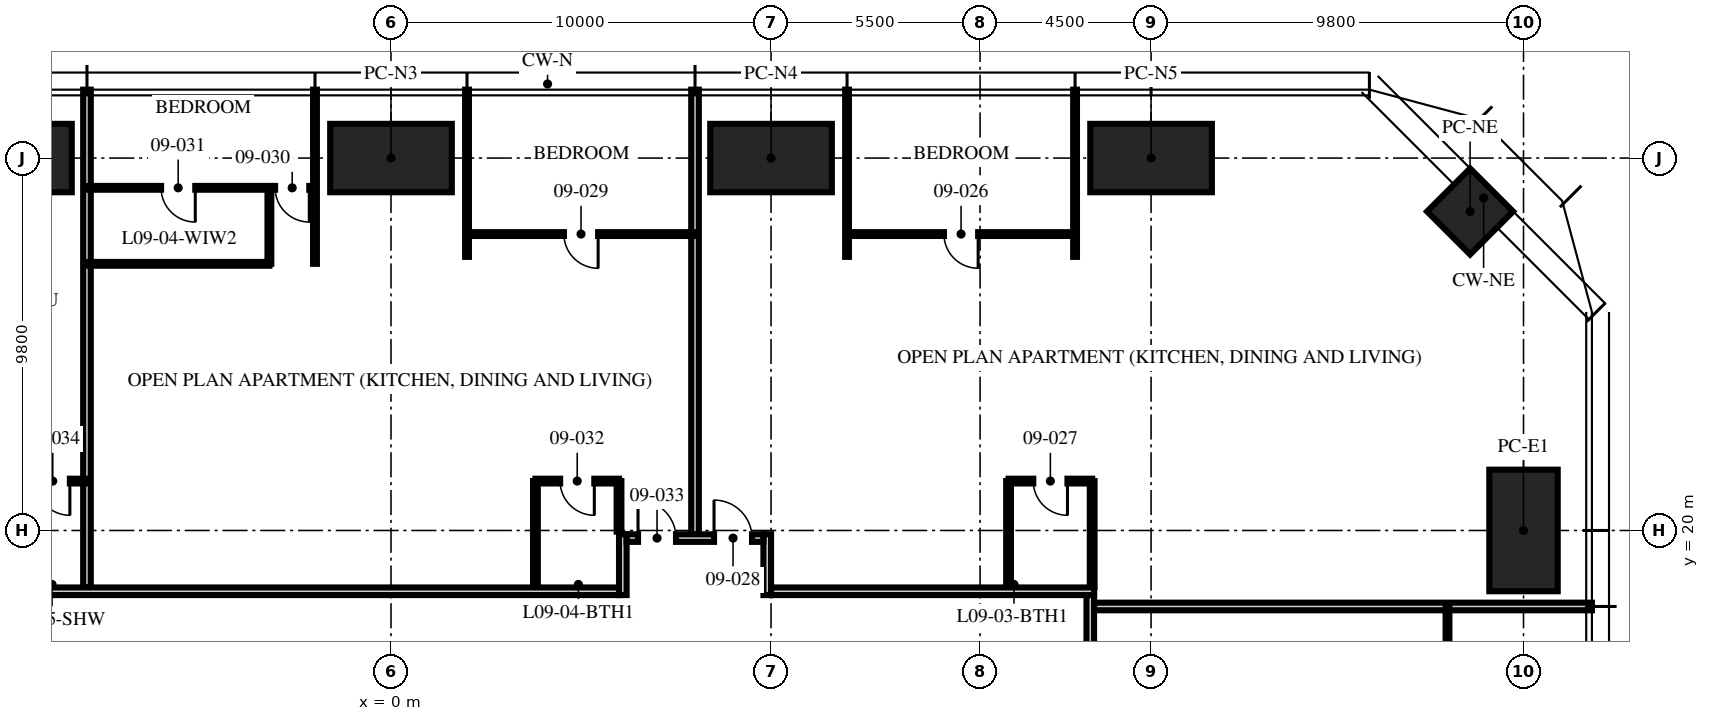
"""IFC4 building model, lengths in metres.
Left out: names, types, materials, properties, quantities, classifications, styles, units other than length and angle.
Written with IfcOpenShell. Run it as: python <this file> out.ifc"""

import sys

from ifc_helpers import new_model, si_unit, direction, frame, frame_2d, origin, origin_2d, place, context, subcontext, project, spatial, rectangle, hollow_rectangle, extrude, element, fill, save


model = new_model("IFC4")
c1 = context("Model", 3, precision=1e-05, world=origin(), true_north=direction((0.0, 1.0)))
c2 = subcontext(c1, "Body", "Model", "MODEL_VIEW")
j1 = project(units=[si_unit("LENGTHUNIT", "METRE"), si_unit("PLANEANGLEUNIT", "RADIAN")], contexts=[c1])
p1 = place(None, origin())
s1 = spatial("IfcSite", under=j1, at=p1, CompositionType="ELEMENT")
p2 = place(p1, origin())
s2 = spatial("IfcBuilding", under=s1, at=p2, CompositionType="ELEMENT")
p3 = place(p2, frame((0.0, 0.0, 39.75)))
s3 = spatial("IfcBuildingStorey", under=s2, at=p3, CompositionType="ELEMENT", Elevation=39.75)
for number, where, z_axis, x_axis in (
    (1, (-10.0, 29.8, 0.0), (0.0, 0.0, 1.0), (1.0, 0.0, 0.0)),
    (2, (0.0, 29.8, 0.0), (0.0, 0.0, 1.0), (1.0, 0.0, 0.0)),
    (3, (10.0, 29.8, 0.0), (0.0, 0.0, 1.0), (1.0, 0.0, 0.0)),
    (4, (20.0, 29.8, 0.0), (0.0, 0.0, 1.0), (1.0, 0.0, 0.0)),
    (5, (29.8, 20.0, 0.0), (0.0, 0.0, 1.0), (0.0, 1.0, 0.0)),
):
    element("IfcColumn", number, at=place(p3, frame(where, z_axis=z_axis, x_axis=x_axis)), inside=s3, PredefinedType="COLUMN", context=c2, shape_type="SweptSolid", body=[
        extrude(hollow_rectangle(XDim=3.2, YDim=1.8, WallThickness=0.2, at=origin_2d()), origin(), (0.0, 0.0, 1.0), 3.75),
    ])
p4 = place(p3, frame((28.394, 28.394, 0.0), z_axis=(0.0, 0.0, 1.0), x_axis=(0.707106781187, -0.707106781187, 0.0)))
e6 = element("IfcColumn", 6, at=p4, inside=s3, PredefinedType="COLUMN", context=c2, shape_type="SweptSolid", body=[
    extrude(hollow_rectangle(XDim=1.6, YDim=1.6, WallThickness=0.1, at=origin_2d()), origin(), (0.0, 0.0, 1.0), 3.75),
])
p5 = place(p3, frame((18.5, 18.0, 0.0), z_axis=(0.0, 0.0, 1.0), x_axis=(1.0, 0.0, 0.0)))
e7 = element("IfcWall", 7, at=p5, inside=s3, PredefinedType="PARTITIONING", context=c2, shape_type="SweptSolid", body=[
    extrude(rectangle(XDim=13.1, YDim=0.2, at=frame_2d((6.55, 0.0))), origin(), (0.0, 0.0, 1.0), 2.3),
])
for number, where, z_axis, x_axis in (
    (8, (18.0, 27.2, 0.0), (0.0, 0.0, 1.0), (0.0, 1.0, 0.0)),
    (9, (12.0, 27.2, 0.0), (0.0, 0.0, 1.0), (0.0, 1.0, 0.0)),
):
    element("IfcWall", number, at=place(p3, frame(where, z_axis=z_axis, x_axis=x_axis)), inside=s3, PredefinedType="PARTITIONING", context=c2, shape_type="SweptSolid", body=[
        extrude(rectangle(XDim=4.4, YDim=0.1, at=frame_2d((2.2, 0.0))), origin(), (0.0, 0.0, 1.0), 2.71),
    ])
p6 = place(p3, frame((8.0, 19.9, 0.0), z_axis=(0.0, 0.0, 1.0), x_axis=(0.0, 1.0, 0.0)))
e10 = element("IfcWall", 10, at=p6, inside=s3, PredefinedType="PARTITIONING", context=c2, shape_type="SweptSolid", body=[
    extrude(rectangle(XDim=11.7, YDim=0.2, at=frame_2d((5.85, 0.0))), origin(), (0.0, 0.0, 1.0), 2.71),
])
p7 = place(p3, frame((2.0, 27.2, 0.0), z_axis=(0.0, 0.0, 1.0), x_axis=(0.0, 1.0, 0.0)))
e11 = element("IfcWall", 11, at=p7, inside=s3, PredefinedType="PARTITIONING", context=c2, shape_type="SweptSolid", body=[
    extrude(rectangle(XDim=4.4, YDim=0.1, at=frame_2d((2.2, 0.0))), origin(), (0.0, 0.0, 1.0), 2.71),
])
p8 = place(p3, frame((-2.0, 27.017, 0.0), z_axis=(0.0, 0.0, 1.0), x_axis=(0.0, 1.0, 0.0)))
e12 = element("IfcWall", 12, at=p8, inside=s3, PredefinedType="PARTITIONING", context=c2, shape_type="SweptSolid", body=[
    extrude(rectangle(XDim=4.583, YDim=0.1, at=frame_2d((2.292, 0.0))), origin(), (0.0, 0.0, 1.0), 2.71),
])
p9 = place(p3, frame((-8.0, 18.5, 0.0), z_axis=(0.0, 0.0, 1.0), x_axis=(0.0, 1.0, 0.0)))
e13 = element("IfcWall", 13, at=p9, inside=s3, PredefinedType="PARTITIONING", context=c2, shape_type="SweptSolid", body=[
    extrude(rectangle(XDim=13.1, YDim=0.2, at=frame_2d((6.55, 0.0))), origin(), (0.0, 0.0, 1.0), 2.71),
])
p10 = place(p3, frame((27.8, 12.0, 0.0), z_axis=(0.0, 0.0, 1.0), x_axis=(0.0, 1.0, 0.0)))
e14 = element("IfcWall", 14, at=p10, inside=s3, PredefinedType="PARTITIONING", context=c2, shape_type="SweptSolid", body=[
    extrude(rectangle(XDim=6.0, YDim=0.1, at=frame_2d((3.0, 0.0))), origin(), (0.0, 0.0, 1.0), 2.61),
])
p11 = place(p10, frame((2.55, 0.0, 0.0)))
e15 = element("IfcOpeningElement", 15, at=p11, cuts=e14, PredefinedType="OPENING", context=c2, shape_type="SweptSolid", body=[
    extrude(rectangle(XDim=0.9, YDim=2.1, at=frame_2d((0.45, 1.05))), frame((0.0, 0.06, 0.0), z_axis=(0.0, -1.0, 0.0), x_axis=(1.0, 0.0, 0.0)), (0.0, 0.0, 1.0), 0.12),
])
p12 = place(p3, frame((18.0, 27.8, 0.0), z_axis=(0.0, 0.0, 1.0), x_axis=(-1.0, 0.0, 0.0)))
e16 = element("IfcWall", 16, at=p12, inside=s3, PredefinedType="PARTITIONING", context=c2, shape_type="SweptSolid", body=[
    extrude(rectangle(XDim=6.0, YDim=0.1, at=frame_2d((3.0, 0.0))), origin(), (0.0, 0.0, 1.0), 2.61),
])
p13 = place(p12, frame((2.55, 0.0, 0.0)))
e17 = element("IfcOpeningElement", 17, at=p13, cuts=e16, PredefinedType="OPENING", context=c2, shape_type="SweptSolid", body=[
    extrude(rectangle(XDim=0.9, YDim=2.1, at=frame_2d((0.45, 1.05))), frame((0.0, 0.06, 0.0), z_axis=(0.0, -1.0, 0.0), x_axis=(1.0, 0.0, 0.0)), (0.0, 0.0, 1.0), 0.12),
])
p14 = place(p3, frame((18.45, 21.3, 0.0), z_axis=(0.0, 0.0, 1.0), x_axis=(-1.0, 0.0, 0.0)))
e18 = element("IfcWall", 18, at=p14, inside=s3, PredefinedType="PARTITIONING", context=c2, shape_type="SweptSolid", body=[
    extrude(rectangle(XDim=2.2, YDim=0.125, at=frame_2d((1.1, 0.0))), origin(), (0.0, 0.0, 1.0), 3.5),
])
p15 = place(p14, frame((0.65, 0.0, 0.0)))
e19 = element("IfcOpeningElement", 19, at=p15, cuts=e18, PredefinedType="OPENING", context=c2, shape_type="SweptSolid", body=[
    extrude(rectangle(XDim=0.9, YDim=2.1, at=frame_2d((0.45, 1.05))), frame((0.0, 0.073, 0.0), z_axis=(0.0, -1.0, 0.0), x_axis=(1.0, 0.0, 0.0)), (0.0, 0.0, 1.0), 0.145),
])
p16 = place(p3, frame((18.45, 18.5, 0.0), z_axis=(0.0, 0.0, 1.0), x_axis=(0.0, 1.0, 0.0)))
e20 = element("IfcWall", 20, at=p16, inside=s3, PredefinedType="PARTITIONING", context=c2, shape_type="SweptSolid", body=[
    extrude(rectangle(XDim=2.8, YDim=0.125, at=frame_2d((1.4, 0.0))), origin(), (0.0, 0.0, 1.0), 2.3),
])
p17 = place(p3, frame((16.25, 18.5, 0.0), z_axis=(0.0, 0.0, 1.0), x_axis=(0.0, 1.0, 0.0)))
e21 = element("IfcWall", 21, at=p17, inside=s3, PredefinedType="PARTITIONING", context=c2, shape_type="SweptSolid", body=[
    extrude(rectangle(XDim=2.8, YDim=0.125, at=frame_2d((1.4, 0.0))), origin(), (0.0, 0.0, 1.0), 3.5),
])
p18 = place(p3, frame((8.0, 27.8, 0.0), z_axis=(0.0, 0.0, 1.0), x_axis=(-1.0, 0.0, 0.0)))
e22 = element("IfcWall", 22, at=p18, inside=s3, PredefinedType="PARTITIONING", context=c2, shape_type="SweptSolid", body=[
    extrude(rectangle(XDim=6.0, YDim=0.1, at=frame_2d((3.0, 0.0))), origin(), (0.0, 0.0, 1.0), 2.61),
])
p19 = place(p18, frame((2.55, 0.0, 0.0)))
e23 = element("IfcOpeningElement", 23, at=p19, cuts=e22, PredefinedType="OPENING", context=c2, shape_type="SweptSolid", body=[
    extrude(rectangle(XDim=0.9, YDim=2.1, at=frame_2d((0.45, 1.05))), frame((0.0, 0.06, 0.0), z_axis=(0.0, -1.0, 0.0), x_axis=(1.0, 0.0, 0.0)), (0.0, 0.0, 1.0), 0.12),
])
p20 = place(p3, frame((-2.0, 29.017, 0.0), z_axis=(0.0, 0.0, 1.0), x_axis=(-1.0, 0.0, 0.0)))
e24 = element("IfcWall", 24, at=p20, inside=s3, PredefinedType="PARTITIONING", context=c2, shape_type="SweptSolid", body=[
    extrude(rectangle(XDim=6.0, YDim=0.1, at=frame_2d((3.0, 0.0))), origin(), (0.0, 0.0, 1.0), 2.61),
])
p21 = place(p20, frame((0.15, 0.0, 0.0)))
e25 = element("IfcOpeningElement", 25, at=p21, cuts=e24, PredefinedType="OPENING", context=c2, shape_type="SweptSolid", body=[
    extrude(rectangle(XDim=0.9, YDim=2.1, at=frame_2d((0.45, 1.05))), frame((0.0, 0.06, 0.0), z_axis=(0.0, -1.0, 0.0), x_axis=(1.0, 0.0, 0.0)), (0.0, 0.0, 1.0), 0.12),
])
p22 = place(p20, frame((3.15, 0.0, 0.0)))
e26 = element("IfcOpeningElement", 26, at=p22, cuts=e24, PredefinedType="OPENING", context=c2, shape_type="SweptSolid", body=[
    extrude(rectangle(XDim=0.9, YDim=2.1, at=frame_2d((0.45, 1.05))), frame((0.0, 0.06, 0.0), z_axis=(0.0, -1.0, 0.0), x_axis=(1.0, 0.0, 0.0)), (0.0, 0.0, 1.0), 0.12),
])
p23 = place(p3, frame((-3.2, 27.017, 0.0), z_axis=(0.0, 0.0, 1.0), x_axis=(0.0, 1.0, 0.0)))
e27 = element("IfcWall", 27, at=p23, inside=s3, PredefinedType="PARTITIONING", context=c2, shape_type="SweptSolid", body=[
    extrude(rectangle(XDim=2.0, YDim=0.1, at=frame_2d((1.0, 0.0))), origin(), (0.0, 0.0, 1.0), 3.5),
])
p24 = place(p3, frame((-3.2, 27.017, 0.0), z_axis=(0.0, 0.0, 1.0), x_axis=(-1.0, 0.0, 0.0)))
e28 = element("IfcWall", 28, at=p24, inside=s3, PredefinedType="PARTITIONING", context=c2, shape_type="SweptSolid", body=[
    extrude(rectangle(XDim=4.8, YDim=0.1, at=frame_2d((2.4, 0.0))), origin(), (0.0, 0.0, 1.0), 2.61),
])
p25 = place(p3, frame((6.0, 21.3, 0.0), z_axis=(0.0, 0.0, 1.0), x_axis=(-1.0, 0.0, 0.0)))
e29 = element("IfcWall", 29, at=p25, inside=s3, PredefinedType="PARTITIONING", context=c2, shape_type="SweptSolid", body=[
    extrude(rectangle(XDim=2.2, YDim=0.125, at=frame_2d((1.1, 0.0))), origin(), (0.0, 0.0, 1.0), 2.61),
])
p26 = place(p25, frame((0.65, 0.0, 0.0)))
e30 = element("IfcOpeningElement", 30, at=p26, cuts=e29, PredefinedType="OPENING", context=c2, shape_type="SweptSolid", body=[
    extrude(rectangle(XDim=0.9, YDim=2.1, at=frame_2d((0.45, 1.05))), frame((0.0, 0.073, 0.0), z_axis=(0.0, -1.0, 0.0), x_axis=(1.0, 0.0, 0.0)), (0.0, 0.0, 1.0), 0.145),
])
p27 = place(p3, frame((6.0, 19.97, 0.0), z_axis=(0.0, 0.0, 1.0), x_axis=(0.0, 1.0, 0.0)))
e31 = element("IfcWall", 31, at=p27, inside=s3, PredefinedType="PARTITIONING", context=c2, shape_type="SweptSolid", body=[
    extrude(rectangle(XDim=1.33, YDim=0.125, at=frame_2d((0.665, 0.0))), origin(), (0.0, 0.0, 1.0), 3.5),
])
p28 = place(p3, frame((3.8, 18.5, 0.0), z_axis=(0.0, 0.0, 1.0), x_axis=(0.0, 1.0, 0.0)))
e32 = element("IfcWall", 32, at=p28, inside=s3, PredefinedType="PARTITIONING", context=c2, shape_type="SweptSolid", body=[
    extrude(rectangle(XDim=2.8, YDim=0.125, at=frame_2d((1.4, 0.0))), origin(), (0.0, 0.0, 1.0), 3.5),
])
p29 = place(p3, frame((-8.0, 21.3, 0.0), z_axis=(0.0, 0.0, 1.0), x_axis=(-1.0, 0.0, 0.0)))
e33 = element("IfcWall", 33, at=p29, inside=s3, PredefinedType="PARTITIONING", context=c2, shape_type="SweptSolid", body=[
    extrude(rectangle(XDim=1.8, YDim=0.125, at=frame_2d((0.9, 0.0))), origin(), (0.0, 0.0, 1.0), 3.5),
])
p30 = place(p29, frame((0.45, 0.0, 0.0)))
e34 = element("IfcOpeningElement", 34, at=p30, cuts=e33, PredefinedType="OPENING", context=c2, shape_type="SweptSolid", body=[
    extrude(rectangle(XDim=0.9, YDim=2.1, at=frame_2d((0.45, 1.05))), frame((0.0, 0.073, 0.0), z_axis=(0.0, -1.0, 0.0), x_axis=(1.0, 0.0, 0.0)), (0.0, 0.0, 1.0), 0.145),
])
p31 = place(p3, frame((18.4, 0.0, 0.0), z_axis=(0.0, 0.0, 1.0), x_axis=(0.0, 1.0, 0.0)))
e35 = element("IfcWall", 35, at=p31, inside=s3, PredefinedType="PARTITIONING", context=c2, shape_type="SweptSolid", body=[
    extrude(rectangle(XDim=18.3, YDim=0.2, at=frame_2d((9.15, 0.0))), origin(), (0.0, 0.0, 1.0), 2.3),
])
p32 = place(p3, frame((-10.0, 18.4, 0.0), z_axis=(0.0, 0.0, 1.0), x_axis=(1.0, 0.0, 0.0)))
e36 = element("IfcWall", 36, at=p32, inside=s3, PredefinedType="PARTITIONING", context=c2, shape_type="SweptSolid", body=[
    extrude(rectangle(XDim=16.0, YDim=0.2, at=frame_2d((8.0, 0.0))), origin(), (0.0, 0.0, 1.0), 2.492),
])
p33 = place(p3, frame((6.1, 18.3, 0.0), z_axis=(0.0, 0.0, 1.0), x_axis=(0.0, 1.0, 0.0)))
e37 = element("IfcWall", 37, at=p33, inside=s3, PredefinedType="PARTITIONING", context=c2, shape_type="SweptSolid", body=[
    extrude(rectangle(XDim=1.6, YDim=0.2, at=frame_2d((0.8, 0.0))), origin(), (0.0, 0.0, 1.0), 3.5),
])
p34 = place(p3, frame((9.9, 18.3, 0.0), z_axis=(0.0, 0.0, 1.0), x_axis=(0.0, 1.0, 0.0)))
e38 = element("IfcWall", 38, at=p34, inside=s3, PredefinedType="PARTITIONING", context=c2, shape_type="SweptSolid", body=[
    extrude(rectangle(XDim=1.6, YDim=0.2, at=frame_2d((0.8, 0.0))), origin(), (0.0, 0.0, 1.0), 2.492),
])
p35 = place(p3, frame((6.2, 19.8, 0.0), z_axis=(0.0, 0.0, 1.0), x_axis=(1.0, 0.0, 0.0)))
e39 = element("IfcWall", 39, at=p35, inside=s3, PredefinedType="PARTITIONING", context=c2, shape_type="SweptSolid", body=[
    extrude(rectangle(XDim=3.6, YDim=0.2, at=frame_2d((1.8, 0.0))), origin(), (0.0, 0.0, 1.0), 3.5),
])
p36 = place(p35, frame((2.3, 0.0, 0.0)))
e40 = element("IfcOpeningElement", 40, at=p36, cuts=e39, PredefinedType="OPENING", context=c2, shape_type="SweptSolid", body=[
    extrude(rectangle(XDim=1.0, YDim=2.2, at=frame_2d((0.5, 1.1))), frame((0.0, 0.11, 0.0), z_axis=(0.0, -1.0, 0.0), x_axis=(1.0, 0.0, 0.0)), (0.0, 0.0, 1.0), 0.22),
])
p37 = place(p35, frame((0.3, 0.0, 0.0)))
e41 = element("IfcOpeningElement", 41, at=p37, cuts=e39, PredefinedType="OPENING", context=c2, shape_type="SweptSolid", body=[
    extrude(rectangle(XDim=1.0, YDim=2.2, at=frame_2d((0.5, 1.1))), frame((0.0, 0.11, 0.0), z_axis=(0.0, -1.0, 0.0), x_axis=(1.0, 0.0, 0.0)), (0.0, 0.0, 1.0), 0.22),
])
p38 = place(p3, frame((10.0, 18.4, 0.0), z_axis=(0.0, 0.0, 1.0), x_axis=(1.0, 0.0, 0.0)))
e42 = element("IfcWall", 42, at=p38, inside=s3, PredefinedType="PARTITIONING", context=c2, shape_type="SweptSolid", body=[
    extrude(rectangle(XDim=8.5, YDim=0.2, at=frame_2d((4.25, 0.0))), origin(), (0.0, 0.0, 1.0), 2.3),
])
p39 = place(p13, origin())
e43 = element("IfcDoor", 43, at=p39, inside=s3, OperationType="SINGLE_SWING_LEFT", PredefinedType="DOOR", context=c2, shape_type="SweptSolid", body=[
    extrude(rectangle(XDim=0.9, YDim=2.1, at=frame_2d((0.45, 1.05))), frame((0.0, 0.025, 0.0), z_axis=(0.0, -1.0, 0.0), x_axis=(1.0, 0.0, 0.0)), (0.0, 0.0, 1.0), 0.05),
])
fill(e17, e43)
p40 = place(p15, origin())
e44 = element("IfcDoor", 44, at=p40, inside=s3, OperationType="SINGLE_SWING_LEFT", PredefinedType="DOOR", context=c2, shape_type="SweptSolid", body=[
    extrude(rectangle(XDim=0.9, YDim=2.1, at=frame_2d((0.45, 1.05))), frame((0.0, 0.025, 0.0), z_axis=(0.0, -1.0, 0.0), x_axis=(1.0, 0.0, 0.0)), (0.0, 0.0, 1.0), 0.05),
])
fill(e19, e44)
p41 = place(p36, origin())
e45 = element("IfcDoor", 45, at=p41, inside=s3, OperationType="SINGLE_SWING_LEFT", PredefinedType="DOOR", context=c2, shape_type="SweptSolid", body=[
    extrude(rectangle(XDim=1.0, YDim=2.2, at=frame_2d((0.5, 1.1))), frame((0.0, 0.025, 0.0), z_axis=(0.0, -1.0, 0.0), x_axis=(1.0, 0.0, 0.0)), (0.0, 0.0, 1.0), 0.05),
])
fill(e40, e45)
p42 = place(p19, origin())
e46 = element("IfcDoor", 46, at=p42, inside=s3, OperationType="SINGLE_SWING_LEFT", PredefinedType="DOOR", context=c2, shape_type="SweptSolid", body=[
    extrude(rectangle(XDim=0.9, YDim=2.1, at=frame_2d((0.45, 1.05))), frame((0.0, 0.025, 0.0), z_axis=(0.0, -1.0, 0.0), x_axis=(1.0, 0.0, 0.0)), (0.0, 0.0, 1.0), 0.05),
])
fill(e23, e46)
p43 = place(p21, origin())
e47 = element("IfcDoor", 47, at=p43, inside=s3, OperationType="SINGLE_SWING_LEFT", PredefinedType="DOOR", context=c2, shape_type="SweptSolid", body=[
    extrude(rectangle(XDim=0.9, YDim=2.1, at=frame_2d((0.45, 1.05))), frame((0.0, 0.025, 0.0), z_axis=(0.0, -1.0, 0.0), x_axis=(1.0, 0.0, 0.0)), (0.0, 0.0, 1.0), 0.05),
])
fill(e25, e47)
p44 = place(p22, origin())
e48 = element("IfcDoor", 48, at=p44, inside=s3, OperationType="SINGLE_SWING_LEFT", PredefinedType="DOOR", context=c2, shape_type="SweptSolid", body=[
    extrude(rectangle(XDim=0.9, YDim=2.1, at=frame_2d((0.45, 1.05))), frame((0.0, 0.025, 0.0), z_axis=(0.0, -1.0, 0.0), x_axis=(1.0, 0.0, 0.0)), (0.0, 0.0, 1.0), 0.05),
])
fill(e26, e48)
p45 = place(p26, origin())
e49 = element("IfcDoor", 49, at=p45, inside=s3, OperationType="SINGLE_SWING_LEFT", PredefinedType="DOOR", context=c2, shape_type="SweptSolid", body=[
    extrude(rectangle(XDim=0.9, YDim=2.1, at=frame_2d((0.45, 1.05))), frame((0.0, 0.025, 0.0), z_axis=(0.0, -1.0, 0.0), x_axis=(1.0, 0.0, 0.0)), (0.0, 0.0, 1.0), 0.05),
])
fill(e30, e49)
p46 = place(p37, origin())
e50 = element("IfcDoor", 50, at=p46, inside=s3, OperationType="SINGLE_SWING_LEFT", PredefinedType="DOOR", context=c2, shape_type="SweptSolid", body=[
    extrude(rectangle(XDim=1.0, YDim=2.2, at=frame_2d((0.5, 1.1))), frame((0.0, 0.025, 0.0), z_axis=(0.0, -1.0, 0.0), x_axis=(1.0, 0.0, 0.0)), (0.0, 0.0, 1.0), 0.05),
])
fill(e41, e50)
p47 = place(p30, origin())
e51 = element("IfcDoor", 51, at=p47, inside=s3, OperationType="SINGLE_SWING_LEFT", PredefinedType="DOOR", context=c2, shape_type="SweptSolid", body=[
    extrude(rectangle(XDim=0.9, YDim=2.1, at=frame_2d((0.45, 1.05))), frame((0.0, 0.025, 0.0), z_axis=(0.0, -1.0, 0.0), x_axis=(1.0, 0.0, 0.0)), (0.0, 0.0, 1.0), 0.05),
])
fill(e34, e51)
save(model, sys.argv[1])
